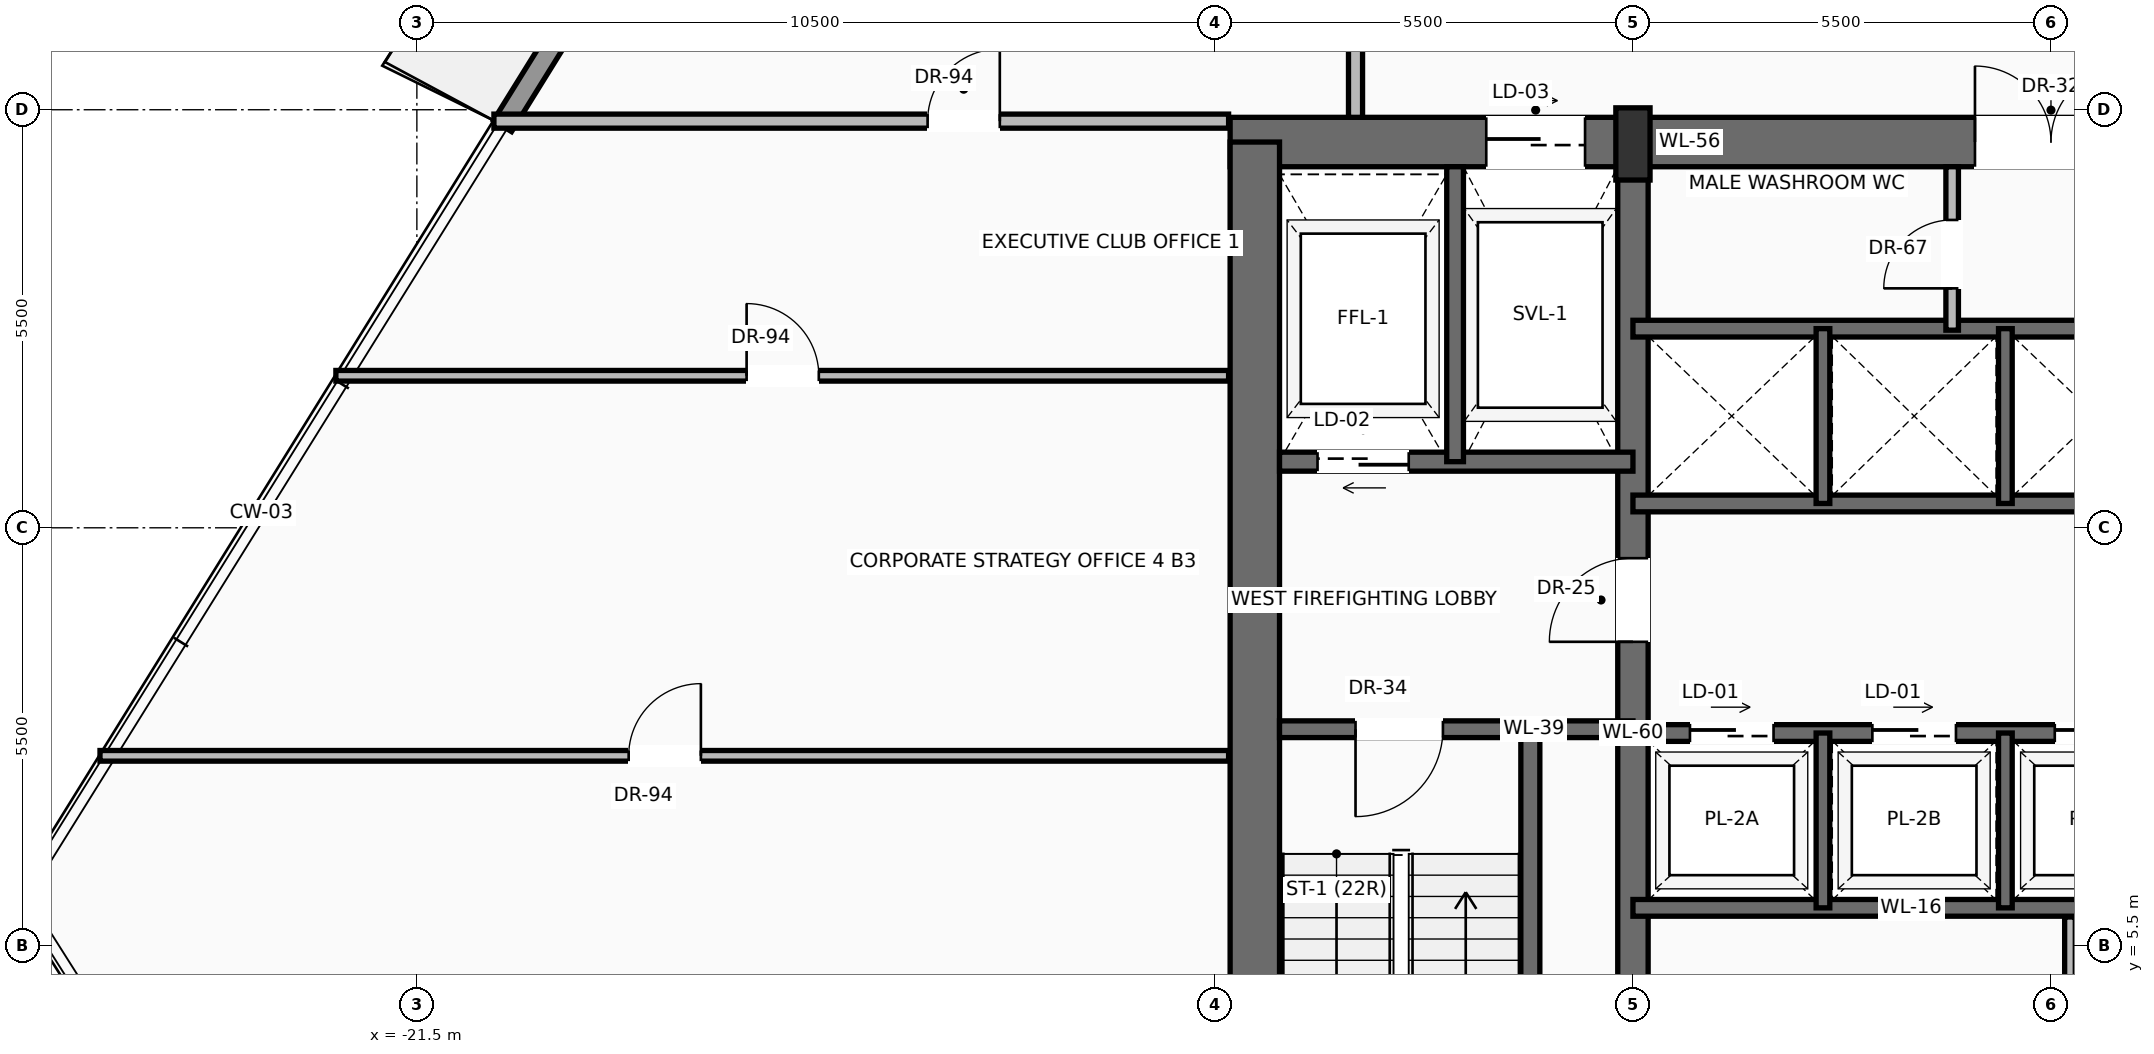
"""IFC4 building model, lengths in metres.
Left out: names, types, materials, properties, quantities, classifications, styles, units other than length and angle.
Written with IfcOpenShell. Run it as: python <this file> out.ifc"""

import sys

from ifc_helpers import new_model, si_unit, direction, frame, frame_2d, origin, origin_2d, place, context, subcontext, project, spatial, rectangle, extrude, source, transform, mapped, element, fill, save


model = new_model("IFC4")
c1 = context("Model", 3, precision=1e-05, world=origin(), true_north=direction((0.0, 1.0)))
c2 = subcontext(c1, "Body", "Model", "MODEL_VIEW")
j1 = project(units=[si_unit("LENGTHUNIT", "METRE"), si_unit("PLANEANGLEUNIT", "RADIAN")], contexts=[c1])
p1 = place(None, origin())
s1 = spatial("IfcSite", under=j1, at=p1, CompositionType="ELEMENT")
p2 = place(p1, origin())
s2 = spatial("IfcBuilding", under=s1, at=p2, CompositionType="ELEMENT")
p3 = place(p2, frame((0.0, 0.0, 185.8)))
s3 = spatial("IfcBuildingStorey", under=s2, at=p3, CompositionType="ELEMENT", Elevation=185.8)
p4 = place(p3, frame((-10.8, 16.075, 0.0), z_axis=(0.0, 0.0, 1.0), x_axis=(1.0, 0.0, 0.0)))
e1 = element("IfcWall", 1, at=p4, inside=s3, PredefinedType="SHEAR", context=c2, shape_type="SweptSolid", body=[
    extrude(rectangle(XDim=21.6, YDim=0.65, at=frame_2d((10.8, 0.0))), origin(), (0.0, 0.0, 1.0), 3.47),
])
p5 = place(p4, frame((3.37, 0.0, 0.0)))
e2 = element("IfcOpeningElement", 2, at=p5, cuts=e1, PredefinedType="OPENING", context=c2, shape_type="SweptSolid", body=[
    extrude(rectangle(XDim=1.3, YDim=2.3, at=frame_2d((0.65, 1.15))), frame((0.0, 0.335, 0.0), z_axis=(0.0, -1.0, 0.0), x_axis=(1.0, 0.0, 0.0)), (0.0, 0.0, 1.0), 0.67),
])
p6 = place(p4, frame((9.8, 0.0, 0.0)))
e3 = element("IfcOpeningElement", 3, at=p6, cuts=e1, PredefinedType="OPENING", context=c2, shape_type="SweptSolid", body=[
    extrude(rectangle(XDim=2.0, YDim=2.4, at=frame_2d((1.0, 1.2))), frame((0.0, 0.335, 0.0), z_axis=(0.0, -1.0, 0.0), x_axis=(1.0, 0.0, 0.0)), (0.0, 0.0, 1.0), 0.67),
])
p7 = place(p3, frame((-10.475, 0.525, 0.0), z_axis=(0.0, 0.0, 1.0), x_axis=(0.0, 1.0, 0.0)))
e4 = element("IfcWall", 4, at=p7, inside=s3, PredefinedType="SHEAR", context=c2, shape_type="SweptSolid", body=[
    extrude(rectangle(XDim=15.55, YDim=0.65, at=frame_2d((7.775, 0.0))), origin(), (0.0, 0.0, 1.0), 3.47),
])
p8 = place(p3, frame((-5.5, 0.525, 0.0), z_axis=(0.0, 0.0, 1.0), x_axis=(0.0, 1.0, 0.0)))
e5 = element("IfcWall", 5, at=p8, inside=s3, PredefinedType="SHEAR", context=c2, shape_type="SweptSolid", body=[
    extrude(rectangle(XDim=15.55, YDim=0.4, at=frame_2d((7.775, 0.0))), origin(), (0.0, 0.0, 1.0), 3.47),
])
p9 = place(p8, frame((8.975, 0.0, 0.0)))
e6 = element("IfcOpeningElement", 6, at=p9, cuts=e5, PredefinedType="OPENING", context=c2, shape_type="SweptSolid", body=[
    extrude(rectangle(XDim=1.1, YDim=2.2, at=frame_2d((0.55, 1.1))), frame((0.0, 0.21, 0.0), z_axis=(0.0, -1.0, 0.0), x_axis=(1.0, 0.0, 0.0)), (0.0, 0.0, 1.0), 0.42),
])
m1 = source(origin(), c2, "Body", "SweptSolid", [
    extrude(rectangle(XDim=0.45, YDim=0.95, at=origin_2d()), origin(), (0.0, 0.0, 1.0), 3.7),
])
p10 = place(p3, frame((-5.5, 16.05, 0.0), z_axis=(0.0, 0.0, 1.0), x_axis=(1.0, 0.0, 0.0)))
e7 = element("IfcColumn", 7, at=p10, inside=s3, PredefinedType="PILASTER", context=c2, shape_type="MappedRepresentation", body=[
    mapped(m1, transform((0.0, 0.0, 0.0), scale=1.0)),
])
p11 = place(p3, frame((-20.373, 16.286, 0.0), z_axis=(0.0, 0.0, 1.0), x_axis=(0.527368326654, 0.849636774182, 0.0)))
e8 = element("IfcWall", 8, at=p11, inside=s3, PredefinedType="SOLIDWALL", context=c2, shape_type="SweptSolid", body=[
    extrude(rectangle(XDim=18.905, YDim=0.28, at=frame_2d((9.453, 0.0))), origin(), (0.0, 0.0, 1.0), 3.05),
])
p12 = place(p11, frame((4.537, 0.0, 0.0)))
e9 = element("IfcOpeningElement", 9, at=p12, cuts=e8, PredefinedType="OPENING", context=c2, shape_type="SweptSolid", body=[
    extrude(rectangle(XDim=1.6, YDim=2.35, at=frame_2d((0.8, 1.175))), frame((0.0, 0.15, 0.0), z_axis=(0.0, -1.0, 0.0), x_axis=(1.0, 0.0, 0.0)), (0.0, 0.0, 1.0), 0.3),
])
p13 = place(p11, frame((12.855, 0.0, 0.9)))
e10 = element("IfcOpeningElement", 10, at=p13, cuts=e8, PredefinedType="OPENING", context=c2, shape_type="SweptSolid", body=[
    extrude(rectangle(XDim=1.55, YDim=1.85, at=frame_2d((0.775, 0.925))), frame((0.0, 0.15, 0.0), z_axis=(0.0, -1.0, 0.0), x_axis=(1.0, 0.0, 0.0)), (0.0, 0.0, 1.0), 0.3),
])
p14 = place(p3, frame((-6.85, 0.85, 0.0), z_axis=(0.0, 0.0, 1.0), x_axis=(0.0, 1.0, 0.0)))
e11 = element("IfcWall", 11, at=p14, inside=s3, PredefinedType="SOLIDWALL", context=c2, shape_type="SweptSolid", body=[
    extrude(rectangle(XDim=7.5, YDim=0.25, at=frame_2d((3.75, 0.0))), origin(), (0.0, 0.0, 1.0), 3.47),
])
p15 = place(p3, frame((-5.5, 8.35, 0.0), z_axis=(0.0, 0.0, 1.0), x_axis=(-1.0, 0.0, 0.0)))
e12 = element("IfcWall", 12, at=p15, inside=s3, PredefinedType="SOLIDWALL", context=c2, shape_type="SweptSolid", body=[
    extrude(rectangle(XDim=4.65, YDim=0.22, at=frame_2d((2.325, 0.0))), origin(), (0.0, 0.0, 1.0), 3.47),
])
p16 = place(p15, frame((2.5, 0.0, 0.0)))
e13 = element("IfcOpeningElement", 13, at=p16, cuts=e12, PredefinedType="OPENING", context=c2, shape_type="SweptSolid", body=[
    extrude(rectangle(XDim=1.15, YDim=2.2, at=frame_2d((0.575, 1.1))), frame((0.0, 0.12, 0.0), z_axis=(0.0, -1.0, 0.0), x_axis=(1.0, 0.0, 0.0)), (0.0, 0.0, 1.0), 0.24),
])
p17 = place(p3, frame((-5.5, 11.87, 0.0), z_axis=(0.0, 0.0, 1.0), x_axis=(-1.0, 0.0, 0.0)))
e14 = element("IfcWall", 14, at=p17, inside=s3, PredefinedType="SOLIDWALL", context=c2, shape_type="SweptSolid", body=[
    extrude(rectangle(XDim=4.65, YDim=0.25, at=frame_2d((2.325, 0.0))), origin(), (0.0, 0.0, 1.0), 3.47),
])
p18 = place(p17, frame((2.95, 0.0, 0.0)))
e15 = element("IfcOpeningElement", 15, at=p18, cuts=e14, PredefinedType="OPENING", context=c2, shape_type="SweptSolid", body=[
    extrude(rectangle(XDim=1.2, YDim=2.25, at=frame_2d((0.6, 1.125))), frame((0.0, 0.135, 0.0), z_axis=(0.0, -1.0, 0.0), x_axis=(1.0, 0.0, 0.0)), (0.0, 0.0, 1.0), 0.27),
])
p19 = place(p3, frame((-7.84, 11.87, 0.0), z_axis=(0.0, 0.0, 1.0), x_axis=(0.0, 1.0, 0.0)))
e16 = element("IfcWall", 16, at=p19, inside=s3, PredefinedType="SOLIDWALL", context=c2, shape_type="SweptSolid", body=[
    extrude(rectangle(XDim=3.88, YDim=0.22, at=frame_2d((1.94, 0.0))), origin(), (0.0, 0.0, 1.0), 3.47),
])
p20 = place(p3, frame((0.25, 0.85, 0.0), z_axis=(0.0, 0.0, 1.0), x_axis=(0.0, 1.0, 0.0)))
e17 = element("IfcWall", 17, at=p20, inside=s3, PredefinedType="PARTITIONING", context=c2, shape_type="SweptSolid", body=[
    extrude(rectangle(XDim=5.03, YDim=0.14, at=frame_2d((2.515, 0.0))), origin(), (0.0, 0.0, 1.0), 3.462),
])
p21 = place(p20, frame((2.1, 0.0, 0.0)))
e18 = element("IfcOpeningElement", 18, at=p21, cuts=e17, PredefinedType="OPENING", context=c2, shape_type="SweptSolid", body=[
    extrude(rectangle(XDim=0.9, YDim=2.1, at=frame_2d((0.45, 1.05))), frame((0.0, 0.08, 0.0), z_axis=(0.0, -1.0, 0.0), x_axis=(1.0, 0.0, 0.0)), (0.0, 0.0, 1.0), 0.16),
])
p22 = place(p3, frame((-5.5, 6.0, 0.0), z_axis=(0.0, 0.0, 1.0), x_axis=(1.0, 0.0, 0.0)))
e19 = element("IfcWall", 19, at=p22, inside=s3, PredefinedType="SOLIDWALL", context=c2, shape_type="SweptSolid", body=[
    extrude(rectangle(XDim=7.32, YDim=0.22, at=frame_2d((3.66, 0.0))), origin(), (0.0, 0.0, 1.0), 3.47),
])
p23 = place(p3, frame((-5.5, 8.3, 0.0), z_axis=(0.0, 0.0, 1.0), x_axis=(1.0, 0.0, 0.0)))
e20 = element("IfcWall", 20, at=p23, inside=s3, PredefinedType="SOLIDWALL", context=c2, shape_type="SweptSolid", body=[
    extrude(rectangle(XDim=7.32, YDim=0.22, at=frame_2d((3.66, 0.0))), origin(), (0.0, 0.0, 1.0), 3.47),
])
p24 = place(p23, frame((0.75, 0.0, 0.0)))
e21 = element("IfcOpeningElement", 21, at=p24, cuts=e20, PredefinedType="OPENING", context=c2, shape_type="SweptSolid", body=[
    extrude(rectangle(XDim=1.1, YDim=2.2, at=frame_2d((0.55, 1.1))), frame((0.0, 0.12, 0.0), z_axis=(0.0, -1.0, 0.0), x_axis=(1.0, 0.0, 0.0)), (0.0, 0.0, 1.0), 0.24),
])
p25 = place(p23, frame((3.15, 0.0, 0.0)))
e22 = element("IfcOpeningElement", 22, at=p25, cuts=e20, PredefinedType="OPENING", context=c2, shape_type="SweptSolid", body=[
    extrude(rectangle(XDim=1.1, YDim=2.2, at=frame_2d((0.55, 1.1))), frame((0.0, 0.12, 0.0), z_axis=(0.0, -1.0, 0.0), x_axis=(1.0, 0.0, 0.0)), (0.0, 0.0, 1.0), 0.24),
])
p26 = place(p23, frame((5.55, 0.0, 0.0)))
e23 = element("IfcOpeningElement", 23, at=p26, cuts=e20, PredefinedType="OPENING", context=c2, shape_type="SweptSolid", body=[
    extrude(rectangle(XDim=1.1, YDim=2.2, at=frame_2d((0.55, 1.1))), frame((0.0, 0.12, 0.0), z_axis=(0.0, -1.0, 0.0), x_axis=(1.0, 0.0, 0.0)), (0.0, 0.0, 1.0), 0.24),
])
for number, where, z_axis, x_axis in (
    (24, (-3.0, 6.0, 0.0), (0.0, 0.0, 1.0), (0.0, 1.0, 0.0)),
    (25, (-0.6, 6.0, 0.0), (0.0, 0.0, 1.0), (0.0, 1.0, 0.0)),
):
    element("IfcWall", number, at=place(p3, frame(where, z_axis=z_axis, x_axis=x_axis)), inside=s3, PredefinedType="SOLIDWALL", context=c2, shape_type="SweptSolid", body=[
        extrude(rectangle(XDim=2.3, YDim=0.18, at=frame_2d((1.15, 0.0))), origin(), (0.0, 0.0, 1.0), 3.47),
    ])
for number, where, z_axis, x_axis in (
    (26, (-5.5, 11.32, 0.0), (0.0, 0.0, 1.0), (1.0, 0.0, 0.0)),
    (27, (-5.5, 13.62, 0.0), (0.0, 0.0, 1.0), (1.0, 0.0, 0.0)),
):
    element("IfcWall", number, at=place(p3, frame(where, z_axis=z_axis, x_axis=x_axis)), inside=s3, PredefinedType="SOLIDWALL", context=c2, shape_type="SweptSolid", body=[
        extrude(rectangle(XDim=7.32, YDim=0.22, at=frame_2d((3.66, 0.0))), origin(), (0.0, 0.0, 1.0), 3.47),
    ])
for number, where, z_axis, x_axis in (
    (28, (-3.0, 11.32, 0.0), (0.0, 0.0, 1.0), (0.0, 1.0, 0.0)),
    (29, (-0.6, 11.32, 0.0), (0.0, 0.0, 1.0), (0.0, 1.0, 0.0)),
):
    element("IfcWall", number, at=place(p3, frame(where, z_axis=z_axis, x_axis=x_axis)), inside=s3, PredefinedType="SOLIDWALL", context=c2, shape_type="SweptSolid", body=[
        extrude(rectangle(XDim=2.3, YDim=0.18, at=frame_2d((1.15, 0.0))), origin(), (0.0, 0.0, 1.0), 3.47),
    ])
p27 = place(p3, frame((-1.3, 13.6, 0.0), z_axis=(0.0, 0.0, 1.0), x_axis=(0.0, 1.0, 0.0)))
e30 = element("IfcWall", 30, at=p27, inside=s3, PredefinedType="PARTITIONING", context=c2, shape_type="SweptSolid", body=[
    extrude(rectangle(XDim=2.15, YDim=0.165, at=frame_2d((1.075, 0.0))), origin(), (0.0, 0.0, 1.0), 3.462),
])
p28 = place(p27, frame((0.55, 0.0, 0.0)))
e31 = element("IfcOpeningElement", 31, at=p28, cuts=e30, PredefinedType="OPENING", context=c2, shape_type="SweptSolid", body=[
    extrude(rectangle(XDim=0.9, YDim=2.1, at=frame_2d((0.45, 1.05))), frame((0.0, 0.093, 0.0), z_axis=(0.0, -1.0, 0.0), x_axis=(1.0, 0.0, 0.0)), (0.0, 0.0, 1.0), 0.185),
])
p29 = place(p3, frame((-9.15, 16.4, 0.0), z_axis=(0.0, 0.0, 1.0), x_axis=(0.0, 1.0, 0.0)))
e32 = element("IfcWall", 32, at=p29, inside=s3, PredefinedType="PARTITIONING", context=c2, shape_type="SweptSolid", body=[
    extrude(rectangle(XDim=7.0, YDim=0.185, at=frame_2d((3.5, 0.0))), origin(), (0.0, 0.0, 1.0), 3.462),
])
p30 = place(p29, frame((2.709, 0.0, 0.0)))
e33 = element("IfcOpeningElement", 33, at=p30, cuts=e32, PredefinedType="OPENING", context=c2, shape_type="SweptSolid", body=[
    extrude(rectangle(XDim=0.95, YDim=2.2, at=frame_2d((0.475, 1.1))), frame((0.0, 0.103, 0.0), z_axis=(0.0, -1.0, 0.0), x_axis=(1.0, 0.0, 0.0)), (0.0, 0.0, 1.0), 0.205),
])
p31 = place(p3, frame((-20.486, 16.35, 0.0), z_axis=(0.0, 0.0, 1.0), x_axis=(1.0, 0.0, 0.0)))
e34 = element("IfcWall", 34, at=p31, inside=s3, PredefinedType="PARTITIONING", context=c2, shape_type="SweptSolid", body=[
    extrude(rectangle(XDim=9.666, YDim=0.185, at=frame_2d((4.833, 0.0))), origin(), (0.0, 0.0, 1.0), 3.462),
])
p32 = place(p31, frame((5.706, 0.0, 0.0)))
e35 = element("IfcOpeningElement", 35, at=p32, cuts=e34, PredefinedType="OPENING", context=c2, shape_type="SweptSolid", body=[
    extrude(rectangle(XDim=0.95, YDim=2.2, at=frame_2d((0.475, 1.1))), frame((0.0, 0.103, 0.0), z_axis=(0.0, -1.0, 0.0), x_axis=(1.0, 0.0, 0.0)), (0.0, 0.0, 1.0), 0.205),
])
p33 = place(p3, frame((-25.669, 8.0, 0.0), z_axis=(0.0, 0.0, 1.0), x_axis=(1.0, 0.0, 0.0)))
e36 = element("IfcWall", 36, at=p33, inside=s3, PredefinedType="PARTITIONING", context=c2, shape_type="SweptSolid", body=[
    extrude(rectangle(XDim=14.849, YDim=0.14, at=frame_2d((7.425, 0.0))), origin(), (0.0, 0.0, 1.0), 3.462),
])
p34 = place(p33, frame((6.956, 0.0, 0.0)))
e37 = element("IfcOpeningElement", 37, at=p34, cuts=e36, PredefinedType="OPENING", context=c2, shape_type="SweptSolid", body=[
    extrude(rectangle(XDim=0.95, YDim=2.2, at=frame_2d((0.475, 1.1))), frame((0.0, 0.08, 0.0), z_axis=(0.0, -1.0, 0.0), x_axis=(1.0, 0.0, 0.0)), (0.0, 0.0, 1.0), 0.16),
])
p35 = place(p3, frame((-22.566, 13.0, 0.0), z_axis=(0.0, 0.0, 1.0), x_axis=(1.0, 0.0, 0.0)))
e38 = element("IfcWall", 38, at=p35, inside=s3, PredefinedType="PARTITIONING", context=c2, shape_type="SweptSolid", body=[
    extrude(rectangle(XDim=11.746, YDim=0.14, at=frame_2d((5.873, 0.0))), origin(), (0.0, 0.0, 1.0), 3.462),
])
p36 = place(p35, frame((5.404, 0.0, 0.0)))
e39 = element("IfcOpeningElement", 39, at=p36, cuts=e38, PredefinedType="OPENING", context=c2, shape_type="SweptSolid", body=[
    extrude(rectangle(XDim=0.95, YDim=2.2, at=frame_2d((0.475, 1.1))), frame((0.0, 0.08, 0.0), z_axis=(0.0, -1.0, 0.0), x_axis=(1.0, 0.0, 0.0)), (0.0, 0.0, 1.0), 0.16),
])
m2 = source(origin(), c2, "Body", "SweptSolid", [
    extrude(rectangle(XDim=1.15, YDim=2.2, at=frame_2d((0.575, 1.1))), frame((0.0, 0.025, 0.0), z_axis=(0.0, -1.0, 0.0), x_axis=(1.0, 0.0, 0.0)), (0.0, 0.0, 1.0), 0.05),
])
p37 = place(p16, origin())
e40 = element("IfcDoor", 40, at=p37, inside=s3, OperationType="SINGLE_SWING_RIGHT", PredefinedType="DOOR", context=c2, shape_type="MappedRepresentation", body=[
    mapped(m2, transform((0.0, 0.0, 0.0), scale=1.0)),
])
fill(e13, e40)
m3 = source(origin(), c2, "Body", "SweptSolid", [
    extrude(rectangle(XDim=1.1, YDim=2.2, at=frame_2d((0.55, 1.1))), frame((0.0, 0.025, 0.0), z_axis=(0.0, -1.0, 0.0), x_axis=(1.0, 0.0, 0.0)), (0.0, 0.0, 1.0), 0.05),
])
p38 = place(p9, origin())
e41 = element("IfcDoor", 41, at=p38, inside=s3, OperationType="SINGLE_SWING_LEFT", PredefinedType="DOOR", context=c2, shape_type="MappedRepresentation", body=[
    mapped(m3, transform((0.0, 0.0, 0.0), scale=1.0)),
])
fill(e6, e41)
m4 = source(origin(), c2, "Body", "SweptSolid", [
    extrude(rectangle(XDim=1.2, YDim=2.25, at=frame_2d((0.6, 1.125))), frame((0.0, 0.025, 0.0), z_axis=(0.0, -1.0, 0.0), x_axis=(1.0, 0.0, 0.0)), (0.0, 0.0, 1.0), 0.05),
])
p39 = place(p18, origin())
e42 = element("IfcDoor", 42, at=p39, inside=s3, OperationType="SLIDING_TO_LEFT", PredefinedType="DOOR", context=c2, shape_type="MappedRepresentation", body=[
    mapped(m4, transform((0.0, 0.0, 0.0), scale=1.0)),
])
fill(e15, e42)
m5 = source(origin(), c2, "Body", "SweptSolid", [
    extrude(rectangle(XDim=1.3, YDim=2.3, at=frame_2d((0.65, 1.15))), frame((0.0, 0.025, 0.0), z_axis=(0.0, -1.0, 0.0), x_axis=(1.0, 0.0, 0.0)), (0.0, 0.0, 1.0), 0.05),
])
p40 = place(p5, origin())
e43 = element("IfcDoor", 43, at=p40, inside=s3, OperationType="SLIDING_TO_RIGHT", PredefinedType="DOOR", context=c2, shape_type="MappedRepresentation", body=[
    mapped(m5, transform((0.0, 0.0, 0.0), scale=1.0)),
])
fill(e2, e43)
m6 = source(origin(), c2, "Body", "SweptSolid", [
    extrude(rectangle(XDim=2.0, YDim=2.4, at=frame_2d((1.0, 1.2))), frame((0.0, 0.025, 0.0), z_axis=(0.0, -1.0, 0.0), x_axis=(1.0, 0.0, 0.0)), (0.0, 0.0, 1.0), 0.05),
])
p41 = place(p6, origin())
e44 = element("IfcDoor", 44, at=p41, inside=s3, OperationType="DOUBLE_DOOR_SINGLE_SWING", PredefinedType="DOOR", context=c2, shape_type="MappedRepresentation", body=[
    mapped(m6, transform((0.0, 0.0, 0.0), scale=1.0)),
])
fill(e3, e44)
m7 = source(origin(), c2, "Body", "SweptSolid", [
    extrude(rectangle(XDim=1.1, YDim=2.2, at=frame_2d((0.55, 1.1))), frame((0.0, 0.025, 0.0), z_axis=(0.0, -1.0, 0.0), x_axis=(1.0, 0.0, 0.0)), (0.0, 0.0, 1.0), 0.05),
])
p42 = place(p24, origin())
e45 = element("IfcDoor", 45, at=p42, inside=s3, OperationType="SLIDING_TO_LEFT", PredefinedType="DOOR", context=c2, shape_type="MappedRepresentation", body=[
    mapped(m7, transform((0.0, 0.0, 0.0), scale=1.0)),
])
fill(e21, e45)
p43 = place(p25, origin())
e46 = element("IfcDoor", 46, at=p43, inside=s3, OperationType="SLIDING_TO_LEFT", PredefinedType="DOOR", context=c2, shape_type="MappedRepresentation", body=[
    mapped(m7, transform((0.0, 0.0, 0.0), scale=1.0)),
])
fill(e22, e46)
p44 = place(p26, origin())
e47 = element("IfcDoor", 47, at=p44, inside=s3, OperationType="SLIDING_TO_LEFT", PredefinedType="DOOR", context=c2, shape_type="MappedRepresentation", body=[
    mapped(m7, transform((0.0, 0.0, 0.0), scale=1.0)),
])
fill(e23, e47)
m8 = source(origin(), c2, "Body", "SweptSolid", [
    extrude(rectangle(XDim=0.9, YDim=2.1, at=frame_2d((0.45, 1.05))), frame((0.0, 0.025, 0.0), z_axis=(0.0, -1.0, 0.0), x_axis=(1.0, 0.0, 0.0)), (0.0, 0.0, 1.0), 0.05),
])
p45 = place(p28, origin())
e48 = element("IfcDoor", 48, at=p45, inside=s3, OperationType="SINGLE_SWING_LEFT", PredefinedType="DOOR", context=c2, shape_type="MappedRepresentation", body=[
    mapped(m8, transform((0.0, 0.0, 0.0), scale=1.0)),
])
fill(e31, e48)
m9 = source(origin(), c2, "Body", "SweptSolid", [
    extrude(rectangle(XDim=0.95, YDim=2.2, at=frame_2d((0.475, 1.1))), frame((0.0, 0.025, 0.0), z_axis=(0.0, -1.0, 0.0), x_axis=(1.0, 0.0, 0.0)), (0.0, 0.0, 1.0), 0.05),
])
p46 = place(p32, origin())
e49 = element("IfcDoor", 49, at=p46, inside=s3, OperationType="SINGLE_SWING_RIGHT", PredefinedType="DOOR", context=c2, shape_type="MappedRepresentation", body=[
    mapped(m9, transform((0.0, 0.0, 0.0), scale=1.0)),
])
fill(e35, e49)
p47 = place(p36, origin())
e50 = element("IfcDoor", 50, at=p47, inside=s3, OperationType="SINGLE_SWING_LEFT", PredefinedType="DOOR", context=c2, shape_type="MappedRepresentation", body=[
    mapped(m9, transform((0.0, 0.0, 0.0), scale=1.0)),
])
fill(e39, e50)
p48 = place(p34, origin())
e51 = element("IfcDoor", 51, at=p48, inside=s3, OperationType="SINGLE_SWING_RIGHT", PredefinedType="DOOR", context=c2, shape_type="MappedRepresentation", body=[
    mapped(m9, transform((0.0, 0.0, 0.0), scale=1.0)),
])
fill(e37, e51)
save(model, sys.argv[1])
